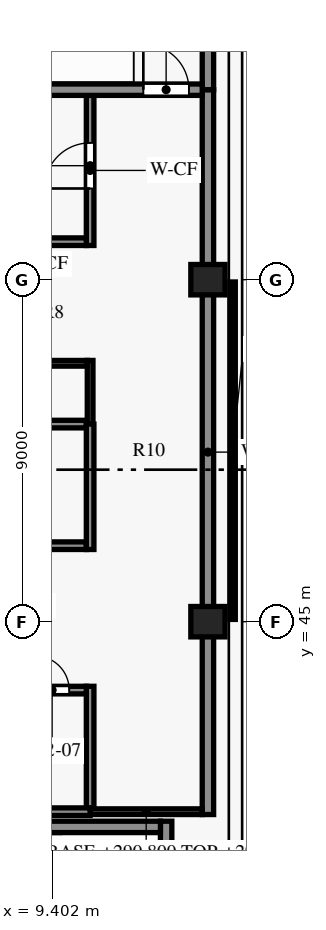
"""IFC4 building model, lengths in metres.
Left out: names, types, materials, properties, quantities, classifications, styles, units other than length and angle.
Written with IfcOpenShell. Run it as: python <this file> out.ifc"""

import sys

from ifc_helpers import new_model, si_unit, direction, frame, frame_2d, origin, origin_2d, place, context, subcontext, project, spatial, rectangle, extrude, element, fill, save


model = new_model("IFC4")
c1 = context("Model", 3, precision=1e-05, world=origin(), true_north=direction((0.0, 1.0)))
c2 = subcontext(c1, "Body", "Model", "MODEL_VIEW")
j1 = project(units=[si_unit("LENGTHUNIT", "METRE"), si_unit("PLANEANGLEUNIT", "RADIAN")], contexts=[c1])
p1 = place(None, origin())
s1 = spatial("IfcSite", under=j1, at=p1, CompositionType="ELEMENT")
p2 = place(p1, origin())
s2 = spatial("IfcBuilding", under=s1, at=p2, CompositionType="ELEMENT")
p3 = place(p2, frame((0.0, 0.0, 290.8)))
s3 = spatial("IfcBuildingStorey", under=s2, at=p3, CompositionType="ELEMENT", Elevation=290.8)
for number, where, z_axis, x_axis in (
    (1, (13.5, 45.0, 0.0), (0.0, 0.0, 1.0), (1.0, 0.0, 0.0)),
    (2, (13.5, 54.0, 0.0), (0.0, 0.0, 1.0), (1.0, 0.0, 0.0)),
):
    element("IfcColumn", number, at=place(p3, frame(where, z_axis=z_axis, x_axis=x_axis)), inside=s3, PredefinedType="COLUMN", context=c2, shape_type="SweptSolid", body=[
        extrude(rectangle(XDim=0.9, YDim=0.8, at=origin_2d()), origin(), (0.0, 0.0, 1.0), 4.0),
    ])
p4 = place(p3, frame((4.55, 39.6, 0.0), z_axis=(0.0, 0.0, 1.0), x_axis=(1.0, 0.0, 0.0)))
e3 = element("IfcWall", 3, at=p4, inside=s3, PredefinedType="SHEAR", context=c2, shape_type="SweptSolid", body=[
    extrude(rectangle(XDim=7.7, YDim=0.3, at=frame_2d((3.85, 0.0))), origin(), (0.0, 0.0, 1.0), 3.7),
])
p5 = place(p3, frame((10.4, 40.0, 0.0), z_axis=(0.0, 0.0, 1.0), x_axis=(1.0, 0.0, 0.0)))
e4 = element("IfcWall", 4, at=p5, inside=s3, PredefinedType="PARTITIONING", context=c2, shape_type="SweptSolid", body=[
    extrude(rectangle(XDim=2.95, YDim=0.15, at=frame_2d((1.475, 0.0))), origin(), (0.0, 0.0, 1.0), 3.35),
])
p6 = place(p3, frame((4.5, 40.0, 0.0), z_axis=(0.0, 0.0, 1.0), x_axis=(1.0, 0.0, 0.0)))
e5 = element("IfcWall", 5, at=p6, inside=s3, PredefinedType="PARTITIONING", context=c2, shape_type="SweptSolid", body=[
    extrude(rectangle(XDim=5.9, YDim=0.2, at=frame_2d((2.95, 0.0))), origin(), (0.0, 0.0, 1.0), 3.7),
])
p7 = place(p3, frame((4.5, 43.2, 0.0), z_axis=(0.0, 0.0, 1.0), x_axis=(1.0, 0.0, 0.0)))
e6 = element("IfcWall", 6, at=p7, inside=s3, PredefinedType="PARTITIONING", context=c2, shape_type="SweptSolid", body=[
    extrude(rectangle(XDim=5.8, YDim=0.2, at=frame_2d((2.9, 0.0))), origin(), (0.0, 0.0, 1.0), 3.7),
])
p8 = place(p7, frame((0.45, 0.0, 0.0)))
e7 = element("IfcOpeningElement", 7, at=p8, cuts=e6, PredefinedType="OPENING", context=c2, shape_type="SweptSolid", body=[
    extrude(rectangle(XDim=0.9, YDim=2.1, at=frame_2d((0.45, 1.05))), frame((0.0, 0.11, 0.0), z_axis=(0.0, -1.0, 0.0), x_axis=(1.0, 0.0, 0.0)), (0.0, 0.0, 1.0), 0.22),
])
p9 = place(p7, frame((2.45, 0.0, 0.0)))
e8 = element("IfcOpeningElement", 8, at=p9, cuts=e6, PredefinedType="OPENING", context=c2, shape_type="SweptSolid", body=[
    extrude(rectangle(XDim=0.9, YDim=2.1, at=frame_2d((0.45, 1.05))), frame((0.0, 0.11, 0.0), z_axis=(0.0, -1.0, 0.0), x_axis=(1.0, 0.0, 0.0)), (0.0, 0.0, 1.0), 0.22),
])
p10 = place(p7, frame((4.45, 0.0, 0.0)))
e9 = element("IfcOpeningElement", 9, at=p10, cuts=e6, PredefinedType="OPENING", context=c2, shape_type="SweptSolid", body=[
    extrude(rectangle(XDim=0.9, YDim=2.1, at=frame_2d((0.45, 1.05))), frame((0.0, 0.11, 0.0), z_axis=(0.0, -1.0, 0.0), x_axis=(1.0, 0.0, 0.0)), (0.0, 0.0, 1.0), 0.22),
])
p11 = place(p3, frame((0.15, 47.0, 0.0), z_axis=(0.0, 0.0, 1.0), x_axis=(1.0, 0.0, 0.0)))
e10 = element("IfcWall", 10, at=p11, inside=s3, PredefinedType="PARTITIONING", context=c2, shape_type="SweptSolid", body=[
    extrude(rectangle(XDim=10.15, YDim=0.2, at=frame_2d((5.075, 0.0))), origin(), (0.0, 0.0, 1.0), 3.7),
])
p12 = place(p11, frame((1.45, 0.0, 0.0)))
e11 = element("IfcOpeningElement", 11, at=p12, cuts=e10, PredefinedType="OPENING", context=c2, shape_type="SweptSolid", body=[
    extrude(rectangle(XDim=0.9, YDim=2.1, at=frame_2d((0.45, 1.05))), frame((0.0, 0.11, 0.0), z_axis=(0.0, -1.0, 0.0), x_axis=(1.0, 0.0, 0.0)), (0.0, 0.0, 1.0), 0.22),
])
p13 = place(p11, frame((4.575, 0.0, 0.0)))
e12 = element("IfcOpeningElement", 12, at=p13, cuts=e10, PredefinedType="OPENING", context=c2, shape_type="SweptSolid", body=[
    extrude(rectangle(XDim=0.9, YDim=2.1, at=frame_2d((0.45, 1.05))), frame((0.0, 0.11, 0.0), z_axis=(0.0, -1.0, 0.0), x_axis=(1.0, 0.0, 0.0)), (0.0, 0.0, 1.0), 0.22),
])
p14 = place(p11, frame((8.05, 0.0, 0.0)))
e13 = element("IfcOpeningElement", 13, at=p14, cuts=e10, PredefinedType="OPENING", context=c2, shape_type="SweptSolid", body=[
    extrude(rectangle(XDim=0.9, YDim=2.1, at=frame_2d((0.45, 1.05))), frame((0.0, 0.11, 0.0), z_axis=(0.0, -1.0, 0.0), x_axis=(1.0, 0.0, 0.0)), (0.0, 0.0, 1.0), 0.22),
])
p15 = place(p3, frame((0.15, 50.2, 0.0), z_axis=(0.0, 0.0, 1.0), x_axis=(1.0, 0.0, 0.0)))
e14 = element("IfcWall", 14, at=p15, inside=s3, PredefinedType="PARTITIONING", context=c2, shape_type="SweptSolid", body=[
    extrude(rectangle(XDim=10.15, YDim=0.2, at=frame_2d((5.075, 0.0))), origin(), (0.0, 0.0, 1.0), 3.7),
])
p16 = place(p3, frame((8.1, 51.8, 0.0), z_axis=(0.0, 0.0, 1.0), x_axis=(1.0, 0.0, 0.0)))
e15 = element("IfcWall", 15, at=p16, inside=s3, PredefinedType="PARTITIONING", context=c2, shape_type="SweptSolid", body=[
    extrude(rectangle(XDim=2.225, YDim=0.15, at=frame_2d((1.112, 0.0))), origin(), (0.0, 0.0, 1.0), 3.7),
])
p17 = place(p3, frame((8.1, 55.0, 0.0), z_axis=(0.0, 0.0, 1.0), x_axis=(1.0, 0.0, 0.0)))
e16 = element("IfcWall", 16, at=p17, inside=s3, PredefinedType="PARTITIONING", context=c2, shape_type="SweptSolid", body=[
    extrude(rectangle(XDim=2.2, YDim=0.2, at=frame_2d((1.1, 0.0))), origin(), (0.0, 0.0, 1.0), 3.7),
])
p18 = place(p3, frame((5.5, 59.0, 0.0), z_axis=(0.0, 0.0, 1.0), x_axis=(1.0, 0.0, 0.0)))
e17 = element("IfcWall", 17, at=p18, inside=s3, PredefinedType="SHEAR", context=c2, shape_type="SweptSolid", body=[
    extrude(rectangle(XDim=7.85, YDim=0.3, at=frame_2d((3.925, 0.0))), origin(), (0.0, 0.0, 1.0), 3.7),
])
p19 = place(p18, frame((6.3, 0.0, 0.0)))
e18 = element("IfcOpeningElement", 18, at=p19, cuts=e17, PredefinedType="OPENING", context=c2, shape_type="SweptSolid", body=[
    extrude(rectangle(XDim=1.2, YDim=2.2, at=frame_2d((0.6, 1.1))), frame((0.0, 0.16, 0.0), z_axis=(0.0, -1.0, 0.0), x_axis=(1.0, 0.0, 0.0)), (0.0, 0.0, 1.0), 0.32),
])
p20 = place(p3, frame((10.4, 54.9, 0.0), z_axis=(0.0, 0.0, 1.0), x_axis=(0.0, 1.0, 0.0)))
e19 = element("IfcWall", 19, at=p20, inside=s3, PredefinedType="PARTITIONING", context=c2, shape_type="SweptSolid", body=[
    extrude(rectangle(XDim=3.95, YDim=0.2, at=frame_2d((1.975, 0.0))), origin(), (0.0, 0.0, 1.0), 3.7),
])
p21 = place(p20, frame((1.5, 0.0, 0.0)))
e20 = element("IfcOpeningElement", 20, at=p21, cuts=e19, PredefinedType="OPENING", context=c2, shape_type="SweptSolid", body=[
    extrude(rectangle(XDim=1.2, YDim=2.2, at=frame_2d((0.6, 1.1))), frame((0.0, 0.11, 0.0), z_axis=(0.0, -1.0, 0.0), x_axis=(1.0, 0.0, 0.0)), (0.0, 0.0, 1.0), 0.22),
])
p22 = place(p3, frame((10.4, 50.2, 0.0), z_axis=(0.0, 0.0, 1.0), x_axis=(0.0, 1.0, 0.0)))
e21 = element("IfcWall", 21, at=p22, inside=s3, PredefinedType="PARTITIONING", context=c2, shape_type="SweptSolid", body=[
    extrude(rectangle(XDim=1.675, YDim=0.15, at=frame_2d((0.837, 0.0))), origin(), (0.0, 0.0, 1.0), 3.7),
])
p23 = place(p3, frame((10.4, 40.1, 0.0), z_axis=(0.0, 0.0, 1.0), x_axis=(0.0, 1.0, 0.0)))
e22 = element("IfcWall", 22, at=p23, inside=s3, PredefinedType="PARTITIONING", context=c2, shape_type="SweptSolid", body=[
    extrude(rectangle(XDim=3.2, YDim=0.2, at=frame_2d((1.6, 0.0))), origin(), (0.0, 0.0, 1.0), 3.7),
])
p24 = place(p3, frame((10.4, 46.9, 0.0), z_axis=(0.0, 0.0, 1.0), x_axis=(0.0, 1.0, 0.0)))
e23 = element("IfcWall", 23, at=p24, inside=s3, PredefinedType="PARTITIONING", context=c2, shape_type="SweptSolid", body=[
    extrude(rectangle(XDim=3.3, YDim=0.2, at=frame_2d((1.65, 0.0))), origin(), (0.0, 0.0, 1.0), 3.7),
])
p25 = place(p3, frame((12.4, 35.85, 0.0), z_axis=(0.0, 0.0, 1.0), x_axis=(0.0, 1.0, 0.0)))
e24 = element("IfcWall", 24, at=p25, inside=s3, PredefinedType="SHEAR", context=c2, shape_type="SweptSolid", body=[
    extrude(rectangle(XDim=3.9, YDim=0.3, at=frame_2d((1.95, 0.0))), origin(), (0.0, 0.0, 1.0), 3.7),
])
p26 = place(p3, frame((13.5, 39.925, 0.0), z_axis=(0.0, 0.0, 1.0), x_axis=(0.0, 1.0, 0.0)))
e25 = element("IfcWall", 25, at=p26, inside=s3, PredefinedType="SHEAR", context=c2, shape_type="SweptSolid", body=[
    extrude(rectangle(XDim=19.075, YDim=0.3, at=frame_2d((9.538, 0.0))), origin(), (0.0, 0.0, 1.0), 3.7),
])
p27 = place(p3, frame((13.5, 59.0, 0.0), z_axis=(0.0, 0.0, 1.0), x_axis=(0.0, 1.0, 0.0)))
e26 = element("IfcWall", 26, at=p27, inside=s3, PredefinedType="SHEAR", context=c2, shape_type="SweptSolid", body=[
    extrude(rectangle(XDim=4.048, YDim=0.3, at=frame_2d((2.024, 0.0))), origin(), (0.0, 0.0, 1.0), 3.7),
])
p28 = place(p21, origin())
e27 = element("IfcDoor", 27, at=p28, inside=s3, OperationType="SINGLE_SWING_RIGHT", PredefinedType="DOOR", context=c2, shape_type="SweptSolid", body=[
    extrude(rectangle(XDim=1.2, YDim=2.2, at=frame_2d((0.6, 1.1))), frame((0.0, 0.025, 0.0), z_axis=(0.0, -1.0, 0.0), x_axis=(1.0, 0.0, 0.0)), (0.0, 0.0, 1.0), 0.05),
])
fill(e20, e27)
p29 = place(p10, origin())
e28 = element("IfcDoor", 28, at=p29, inside=s3, OperationType="SINGLE_SWING_LEFT", PredefinedType="DOOR", context=c2, shape_type="SweptSolid", body=[
    extrude(rectangle(XDim=0.9, YDim=2.1, at=frame_2d((0.45, 1.05))), frame((0.0, 0.025, 0.0), z_axis=(0.0, -1.0, 0.0), x_axis=(1.0, 0.0, 0.0)), (0.0, 0.0, 1.0), 0.05),
])
fill(e9, e28)
p30 = place(p19, origin())
e29 = element("IfcDoor", 29, at=p30, inside=s3, OperationType="SINGLE_SWING_RIGHT", PredefinedType="DOOR", context=c2, shape_type="SweptSolid", body=[
    extrude(rectangle(XDim=1.2, YDim=2.2, at=frame_2d((0.6, 1.1))), frame((0.0, 0.025, 0.0), z_axis=(0.0, -1.0, 0.0), x_axis=(1.0, 0.0, 0.0)), (0.0, 0.0, 1.0), 0.05),
])
fill(e18, e29)
save(model, sys.argv[1])
